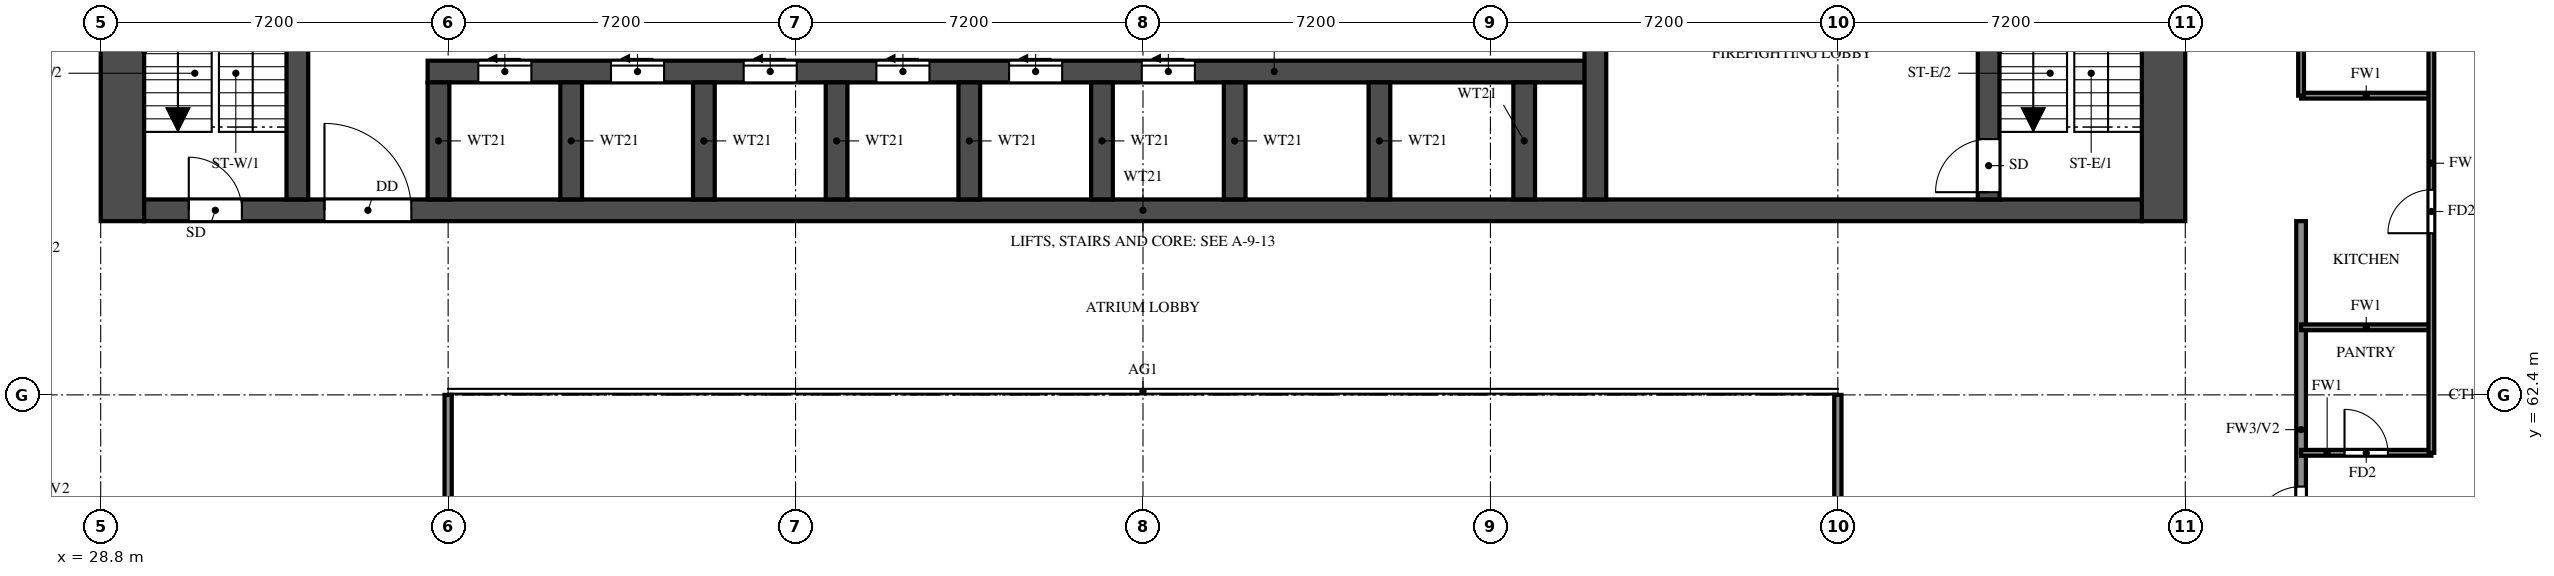
"""IFC4 building model, lengths in metres.
Left out: names, types, materials, properties, quantities, classifications, styles, units other than length and angle.
Written with IfcOpenShell. Run it as: python <this file> out.ifc"""

import sys

from ifc_helpers import new_model, si_unit, direction, frame, frame_2d, origin, place, context, subcontext, project, spatial, rectangle, extrude, element, fill, save


model = new_model("IFC4")
c1 = context("Model", 3, precision=1e-05, world=origin(), true_north=direction((0.0, 1.0)))
c2 = subcontext(c1, "Body", "Model", "MODEL_VIEW")
j1 = project(units=[si_unit("LENGTHUNIT", "METRE"), si_unit("PLANEANGLEUNIT", "RADIAN")], contexts=[c1])
p1 = place(None, origin())
s1 = spatial("IfcSite", under=j1, at=p1, CompositionType="ELEMENT")
p2 = place(p1, origin())
s2 = spatial("IfcBuilding", under=s1, at=p2, CompositionType="ELEMENT")
p3 = place(p2, frame((0.0, 0.0, 83.0)))
s3 = spatial("IfcBuildingStorey", under=s2, at=p3, CompositionType="ELEMENT", Elevation=83.0)
for number, where, z_axis, x_axis in (
    (1, (29.25, 66.0, 0.0), (0.0, 0.0, 1.0), (0.0, 1.0, 0.0)),
    (2, (71.55, 66.0, 0.0), (0.0, 0.0, 1.0), (0.0, 1.0, 0.0)),
):
    element("IfcWall", number, at=place(p3, frame(where, z_axis=z_axis, x_axis=x_axis)), inside=s3, PredefinedType="SHEAR", context=c2, shape_type="SweptSolid", body=[
        extrude(rectangle(XDim=12.0, YDim=0.9, at=frame_2d((6.0, 0.0))), origin(), (0.0, 0.0, 1.0), 3.18),
    ])
p4 = place(p3, frame((29.7, 66.225, 0.0), z_axis=(0.0, 0.0, 1.0), x_axis=(1.0, 0.0, 0.0)))
e3 = element("IfcWall", 3, at=p4, inside=s3, PredefinedType="SHEAR", context=c2, shape_type="SweptSolid", body=[
    extrude(rectangle(XDim=41.4, YDim=0.45, at=frame_2d((20.7, 0.0))), origin(), (0.0, 0.0, 1.0), 3.18),
])
p5 = place(p4, frame((0.925, 0.0, 0.0)))
e4 = element("IfcOpeningElement", 4, at=p5, cuts=e3, PredefinedType="OPENING", context=c2, shape_type="SweptSolid", body=[
    extrude(rectangle(XDim=1.1, YDim=2.1, at=frame_2d((0.55, 1.05))), frame((0.0, 0.235, 0.0), z_axis=(0.0, -1.0, 0.0), x_axis=(1.0, 0.0, 0.0)), (0.0, 0.0, 1.0), 0.47),
])
p6 = place(p4, frame((3.738, 0.0, 0.0)))
e5 = element("IfcOpeningElement", 5, at=p6, cuts=e3, PredefinedType="OPENING", context=c2, shape_type="SweptSolid", body=[
    extrude(rectangle(XDim=1.8, YDim=2.1, at=frame_2d((0.9, 1.05))), frame((0.0, 0.235, 0.0), z_axis=(0.0, -1.0, 0.0), x_axis=(1.0, 0.0, 0.0)), (0.0, 0.0, 1.0), 0.47),
])
p7 = place(p3, frame((35.575, 69.1, 0.0), z_axis=(0.0, 0.0, 1.0), x_axis=(1.0, 0.0, 0.0)))
e6 = element("IfcWall", 6, at=p7, inside=s3, PredefinedType="SHEAR", context=c2, shape_type="SweptSolid", body=[
    extrude(rectangle(XDim=24.2, YDim=0.45, at=frame_2d((12.1, 0.0))), origin(), (0.0, 0.0, 1.0), 3.18),
])
p8 = place(p7, frame((1.05, 0.0, 0.0)))
e7 = element("IfcOpeningElement", 7, at=p8, cuts=e6, PredefinedType="OPENING", context=c2, shape_type="SweptSolid", body=[
    extrude(rectangle(XDim=1.1, YDim=2.1, at=frame_2d((0.55, 1.05))), frame((0.0, 0.235, 0.0), z_axis=(0.0, -1.0, 0.0), x_axis=(1.0, 0.0, 0.0)), (0.0, 0.0, 1.0), 0.47),
])
p9 = place(p7, frame((3.8, 0.0, 0.0)))
e8 = element("IfcOpeningElement", 8, at=p9, cuts=e6, PredefinedType="OPENING", context=c2, shape_type="SweptSolid", body=[
    extrude(rectangle(XDim=1.1, YDim=2.1, at=frame_2d((0.55, 1.05))), frame((0.0, 0.235, 0.0), z_axis=(0.0, -1.0, 0.0), x_axis=(1.0, 0.0, 0.0)), (0.0, 0.0, 1.0), 0.47),
])
p10 = place(p7, frame((6.55, 0.0, 0.0)))
e9 = element("IfcOpeningElement", 9, at=p10, cuts=e6, PredefinedType="OPENING", context=c2, shape_type="SweptSolid", body=[
    extrude(rectangle(XDim=1.1, YDim=2.1, at=frame_2d((0.55, 1.05))), frame((0.0, 0.235, 0.0), z_axis=(0.0, -1.0, 0.0), x_axis=(1.0, 0.0, 0.0)), (0.0, 0.0, 1.0), 0.47),
])
p11 = place(p7, frame((9.3, 0.0, 0.0)))
e10 = element("IfcOpeningElement", 10, at=p11, cuts=e6, PredefinedType="OPENING", context=c2, shape_type="SweptSolid", body=[
    extrude(rectangle(XDim=1.1, YDim=2.1, at=frame_2d((0.55, 1.05))), frame((0.0, 0.235, 0.0), z_axis=(0.0, -1.0, 0.0), x_axis=(1.0, 0.0, 0.0)), (0.0, 0.0, 1.0), 0.47),
])
p12 = place(p7, frame((12.05, 0.0, 0.0)))
e11 = element("IfcOpeningElement", 11, at=p12, cuts=e6, PredefinedType="OPENING", context=c2, shape_type="SweptSolid", body=[
    extrude(rectangle(XDim=1.1, YDim=2.1, at=frame_2d((0.55, 1.05))), frame((0.0, 0.235, 0.0), z_axis=(0.0, -1.0, 0.0), x_axis=(1.0, 0.0, 0.0)), (0.0, 0.0, 1.0), 0.47),
])
p13 = place(p7, frame((14.8, 0.0, 0.0)))
e12 = element("IfcOpeningElement", 12, at=p13, cuts=e6, PredefinedType="OPENING", context=c2, shape_type="SweptSolid", body=[
    extrude(rectangle(XDim=1.1, YDim=2.1, at=frame_2d((0.55, 1.05))), frame((0.0, 0.235, 0.0), z_axis=(0.0, -1.0, 0.0), x_axis=(1.0, 0.0, 0.0)), (0.0, 0.0, 1.0), 0.47),
])
p14 = place(p3, frame((32.875, 66.45, 0.0), z_axis=(0.0, 0.0, 1.0), x_axis=(0.0, 1.0, 0.0)))
e13 = element("IfcWall", 13, at=p14, inside=s3, PredefinedType="SHEAR", context=c2, shape_type="SweptSolid", body=[
    extrude(rectangle(XDim=10.65, YDim=0.45, at=frame_2d((5.325, 0.0))), origin(), (0.0, 0.0, 1.0), 3.18),
])
p15 = place(p3, frame((67.925, 66.45, 0.0), z_axis=(0.0, 0.0, 1.0), x_axis=(0.0, 1.0, 0.0)))
e14 = element("IfcWall", 14, at=p15, inside=s3, PredefinedType="SHEAR", context=c2, shape_type="SweptSolid", body=[
    extrude(rectangle(XDim=10.65, YDim=0.45, at=frame_2d((5.325, 0.0))), origin(), (0.0, 0.0, 1.0), 3.18),
])
p16 = place(p15, frame((0.15, 0.0, 0.0)))
e15 = element("IfcOpeningElement", 15, at=p16, cuts=e14, PredefinedType="OPENING", context=c2, shape_type="SweptSolid", body=[
    extrude(rectangle(XDim=1.1, YDim=2.1, at=frame_2d((0.55, 1.05))), frame((0.0, 0.235, 0.0), z_axis=(0.0, -1.0, 0.0), x_axis=(1.0, 0.0, 0.0)), (0.0, 0.0, 1.0), 0.47),
])
p17 = place(p3, frame((59.775, 66.45, 0.0), z_axis=(0.0, 0.0, 1.0), x_axis=(0.0, 1.0, 0.0)))
e16 = element("IfcWall", 16, at=p17, inside=s3, PredefinedType="SHEAR", context=c2, shape_type="SweptSolid", body=[
    extrude(rectangle(XDim=6.025, YDim=0.45, at=frame_2d((3.013, 0.0))), origin(), (0.0, 0.0, 1.0), 3.18),
])
p18 = place(p17, frame((3.85, 0.0, 0.0)))
e17 = element("IfcOpeningElement", 17, at=p18, cuts=e16, PredefinedType="OPENING", context=c2, shape_type="SweptSolid", body=[
    extrude(rectangle(XDim=1.2, YDim=2.1, at=frame_2d((0.6, 1.05))), frame((0.0, 0.235, 0.0), z_axis=(0.0, -1.0, 0.0), x_axis=(1.0, 0.0, 0.0)), (0.0, 0.0, 1.0), 0.47),
])
for number, where, z_axis, x_axis in (
    (18, (35.8, 66.45, 0.0), (0.0, 0.0, 1.0), (0.0, 1.0, 0.0)),
    (19, (38.55, 66.45, 0.0), (0.0, 0.0, 1.0), (0.0, 1.0, 0.0)),
    (20, (41.3, 66.45, 0.0), (0.0, 0.0, 1.0), (0.0, 1.0, 0.0)),
    (21, (44.05, 66.45, 0.0), (0.0, 0.0, 1.0), (0.0, 1.0, 0.0)),
    (22, (46.8, 66.45, 0.0), (0.0, 0.0, 1.0), (0.0, 1.0, 0.0)),
    (23, (49.55, 66.45, 0.0), (0.0, 0.0, 1.0), (0.0, 1.0, 0.0)),
    (24, (52.3, 66.45, 0.0), (0.0, 0.0, 1.0), (0.0, 1.0, 0.0)),
    (25, (55.3, 66.45, 0.0), (0.0, 0.0, 1.0), (0.0, 1.0, 0.0)),
    (26, (58.3, 66.45, 0.0), (0.0, 0.0, 1.0), (0.0, 1.0, 0.0)),
):
    element("IfcWall", number, at=place(p3, frame(where, z_axis=z_axis, x_axis=x_axis)), inside=s3, PredefinedType="SHEAR", context=c2, shape_type="SweptSolid", body=[
        extrude(rectangle(XDim=2.425, YDim=0.45, at=frame_2d((1.212, 0.0))), origin(), (0.0, 0.0, 1.0), 3.18),
    ])
p19 = place(p3, frame((74.4, 56.4, 0.0), z_axis=(0.0, 0.0, 1.0), x_axis=(0.0, 1.0, 0.0)))
e27 = element("IfcWall", 27, at=p19, inside=s3, PredefinedType="SOLIDWALL", context=c2, shape_type="SweptSolid", body=[
    extrude(rectangle(XDim=9.6, YDim=0.2, at=frame_2d((4.8, 0.0))), origin(), (0.0, 0.0, 1.0), 3.18),
])
p20 = place(p19, frame((0.7, 0.0, 0.0)))
e28 = element("IfcOpeningElement", 28, at=p20, cuts=e27, PredefinedType="OPENING", context=c2, shape_type="SweptSolid", body=[
    extrude(rectangle(XDim=1.0, YDim=2.1, at=frame_2d((0.5, 1.05))), frame((0.0, 0.11, 0.0), z_axis=(0.0, -1.0, 0.0), x_axis=(1.0, 0.0, 0.0)), (0.0, 0.0, 1.0), 0.22),
])
p21 = place(p19, frame((3.1, 0.0, 0.0)))
e29 = element("IfcOpeningElement", 29, at=p21, cuts=e27, PredefinedType="OPENING", context=c2, shape_type="SweptSolid", body=[
    extrude(rectangle(XDim=1.0, YDim=2.1, at=frame_2d((0.5, 1.05))), frame((0.0, 0.11, 0.0), z_axis=(0.0, -1.0, 0.0), x_axis=(1.0, 0.0, 0.0)), (0.0, 0.0, 1.0), 0.22),
])
p22 = place(p3, frame((74.4, 61.2, 0.0), z_axis=(0.0, 0.0, 1.0), x_axis=(1.0, 0.0, 0.0)))
e30 = element("IfcWall", 30, at=p22, inside=s3, PredefinedType="PARTITIONING", context=c2, shape_type="SweptSolid", body=[
    extrude(rectangle(XDim=2.7, YDim=0.12, at=frame_2d((1.35, 0.0))), origin(), (0.0, 0.0, 1.0), 3.18),
])
p23 = place(p22, frame((0.9, 0.0, 0.0)))
e31 = element("IfcOpeningElement", 31, at=p23, cuts=e30, PredefinedType="OPENING", context=c2, shape_type="SweptSolid", body=[
    extrude(rectangle(XDim=0.9, YDim=2.1, at=frame_2d((0.45, 1.05))), frame((0.0, 0.07, 0.0), z_axis=(0.0, -1.0, 0.0), x_axis=(1.0, 0.0, 0.0)), (0.0, 0.0, 1.0), 0.14),
])
for number, where, z_axis, x_axis in (
    (32, (74.4, 63.8, 0.0), (0.0, 0.0, 1.0), (1.0, 0.0, 0.0)),
    (33, (74.4, 68.6, 0.0), (0.0, 0.0, 1.0), (1.0, 0.0, 0.0)),
):
    element("IfcWall", number, at=place(p3, frame(where, z_axis=z_axis, x_axis=x_axis)), inside=s3, PredefinedType="PARTITIONING", context=c2, shape_type="SweptSolid", body=[
        extrude(rectangle(XDim=2.7, YDim=0.12, at=frame_2d((1.35, 0.0))), origin(), (0.0, 0.0, 1.0), 3.18),
    ])
p24 = place(p3, frame((74.4, 68.6, 0.0), z_axis=(0.0, 0.0, 1.0), x_axis=(0.0, 1.0, 0.0)))
e34 = element("IfcWall", 34, at=p24, inside=s3, PredefinedType="PARTITIONING", context=c2, shape_type="SweptSolid", body=[
    extrude(rectangle(XDim=4.6, YDim=0.12, at=frame_2d((2.3, 0.0))), origin(), (0.0, 0.0, 1.0), 3.18),
])
p25 = place(p3, frame((77.1, 61.2, 0.0), z_axis=(0.0, 0.0, 1.0), x_axis=(0.0, 1.0, 0.0)))
e35 = element("IfcWall", 35, at=p25, inside=s3, PredefinedType="PARTITIONING", context=c2, shape_type="SweptSolid", body=[
    extrude(rectangle(XDim=12.0, YDim=0.12, at=frame_2d((6.0, 0.0))), origin(), (0.0, 0.0, 1.0), 3.18),
])
p26 = place(p25, frame((4.55, 0.0, 0.0)))
e36 = element("IfcOpeningElement", 36, at=p26, cuts=e35, PredefinedType="OPENING", context=c2, shape_type="SweptSolid", body=[
    extrude(rectangle(XDim=0.9, YDim=2.1, at=frame_2d((0.45, 1.05))), frame((0.0, 0.07, 0.0), z_axis=(0.0, -1.0, 0.0), x_axis=(1.0, 0.0, 0.0)), (0.0, 0.0, 1.0), 0.14),
])
p27 = place(p25, frame((9.3, 0.0, 0.0)))
e37 = element("IfcOpeningElement", 37, at=p27, cuts=e35, PredefinedType="OPENING", context=c2, shape_type="SweptSolid", body=[
    extrude(rectangle(XDim=0.8, YDim=2.1, at=frame_2d((0.4, 1.05))), frame((0.0, 0.07, 0.0), z_axis=(0.0, -1.0, 0.0), x_axis=(1.0, 0.0, 0.0)), (0.0, 0.0, 1.0), 0.14),
])
for number, where, z_axis, x_axis in (
    (38, (36.0, 48.0, 0.0), (0.0, 0.0, 1.0), (0.0, 1.0, 0.0)),
    (39, (64.8, 48.0, 0.0), (0.0, 0.0, 1.0), (0.0, 1.0, 0.0)),
):
    element("IfcWall", number, at=place(p3, frame(where, z_axis=z_axis, x_axis=x_axis)), inside=s3, PredefinedType="SOLIDWALL", context=c2, shape_type="SweptSolid", body=[
        extrude(rectangle(XDim=14.4, YDim=0.15, at=frame_2d((7.2, 0.0))), origin(), (0.0, 0.0, 1.0), 2.28),
    ])
p28 = place(p5, origin())
e40 = element("IfcDoor", 40, at=p28, inside=s3, OperationType="SINGLE_SWING_LEFT", PredefinedType="DOOR", context=c2, shape_type="SweptSolid", body=[
    extrude(rectangle(XDim=1.1, YDim=2.1, at=frame_2d((0.55, 1.05))), frame((0.0, 0.025, 0.0), z_axis=(0.0, -1.0, 0.0), x_axis=(1.0, 0.0, 0.0)), (0.0, 0.0, 1.0), 0.05),
])
fill(e4, e40)
p29 = place(p16, origin())
e41 = element("IfcDoor", 41, at=p29, inside=s3, OperationType="SINGLE_SWING_LEFT", PredefinedType="DOOR", context=c2, shape_type="SweptSolid", body=[
    extrude(rectangle(XDim=1.1, YDim=2.1, at=frame_2d((0.55, 1.05))), frame((0.0, 0.025, 0.0), z_axis=(0.0, -1.0, 0.0), x_axis=(1.0, 0.0, 0.0)), (0.0, 0.0, 1.0), 0.05),
])
fill(e15, e41)
p30 = place(p6, origin())
e42 = element("IfcDoor", 42, at=p30, inside=s3, OperationType="DOUBLE_DOOR_SINGLE_SWING", PredefinedType="DOOR", context=c2, shape_type="SweptSolid", body=[
    extrude(rectangle(XDim=1.8, YDim=2.1, at=frame_2d((0.9, 1.05))), frame((0.0, 0.025, 0.0), z_axis=(0.0, -1.0, 0.0), x_axis=(1.0, 0.0, 0.0)), (0.0, 0.0, 1.0), 0.05),
])
fill(e5, e42)
p31 = place(p8, origin())
e43 = element("IfcDoor", 43, at=p31, inside=s3, OperationType="SLIDING_TO_LEFT", PredefinedType="DOOR", context=c2, shape_type="SweptSolid", body=[
    extrude(rectangle(XDim=1.1, YDim=2.1, at=frame_2d((0.55, 1.05))), frame((0.0, 0.025, 0.0), z_axis=(0.0, -1.0, 0.0), x_axis=(1.0, 0.0, 0.0)), (0.0, 0.0, 1.0), 0.05),
])
fill(e7, e43)
p32 = place(p9, origin())
e44 = element("IfcDoor", 44, at=p32, inside=s3, OperationType="SLIDING_TO_LEFT", PredefinedType="DOOR", context=c2, shape_type="SweptSolid", body=[
    extrude(rectangle(XDim=1.1, YDim=2.1, at=frame_2d((0.55, 1.05))), frame((0.0, 0.025, 0.0), z_axis=(0.0, -1.0, 0.0), x_axis=(1.0, 0.0, 0.0)), (0.0, 0.0, 1.0), 0.05),
])
fill(e8, e44)
p33 = place(p10, origin())
e45 = element("IfcDoor", 45, at=p33, inside=s3, OperationType="SLIDING_TO_LEFT", PredefinedType="DOOR", context=c2, shape_type="SweptSolid", body=[
    extrude(rectangle(XDim=1.1, YDim=2.1, at=frame_2d((0.55, 1.05))), frame((0.0, 0.025, 0.0), z_axis=(0.0, -1.0, 0.0), x_axis=(1.0, 0.0, 0.0)), (0.0, 0.0, 1.0), 0.05),
])
fill(e9, e45)
p34 = place(p11, origin())
e46 = element("IfcDoor", 46, at=p34, inside=s3, OperationType="SLIDING_TO_LEFT", PredefinedType="DOOR", context=c2, shape_type="SweptSolid", body=[
    extrude(rectangle(XDim=1.1, YDim=2.1, at=frame_2d((0.55, 1.05))), frame((0.0, 0.025, 0.0), z_axis=(0.0, -1.0, 0.0), x_axis=(1.0, 0.0, 0.0)), (0.0, 0.0, 1.0), 0.05),
])
fill(e10, e46)
p35 = place(p12, origin())
e47 = element("IfcDoor", 47, at=p35, inside=s3, OperationType="SLIDING_TO_LEFT", PredefinedType="DOOR", context=c2, shape_type="SweptSolid", body=[
    extrude(rectangle(XDim=1.1, YDim=2.1, at=frame_2d((0.55, 1.05))), frame((0.0, 0.025, 0.0), z_axis=(0.0, -1.0, 0.0), x_axis=(1.0, 0.0, 0.0)), (0.0, 0.0, 1.0), 0.05),
])
fill(e11, e47)
p36 = place(p13, origin())
e48 = element("IfcDoor", 48, at=p36, inside=s3, OperationType="SLIDING_TO_LEFT", PredefinedType="DOOR", context=c2, shape_type="SweptSolid", body=[
    extrude(rectangle(XDim=1.1, YDim=2.1, at=frame_2d((0.55, 1.05))), frame((0.0, 0.025, 0.0), z_axis=(0.0, -1.0, 0.0), x_axis=(1.0, 0.0, 0.0)), (0.0, 0.0, 1.0), 0.05),
])
fill(e12, e48)
p37 = place(p21, origin())
e49 = element("IfcDoor", 49, at=p37, inside=s3, OperationType="SINGLE_SWING_RIGHT", PredefinedType="DOOR", context=c2, shape_type="SweptSolid", body=[
    extrude(rectangle(XDim=1.0, YDim=2.1, at=frame_2d((0.5, 1.05))), frame((0.0, 0.025, 0.0), z_axis=(0.0, -1.0, 0.0), x_axis=(1.0, 0.0, 0.0)), (0.0, 0.0, 1.0), 0.05),
])
fill(e29, e49)
p38 = place(p23, origin())
e50 = element("IfcDoor", 50, at=p38, inside=s3, OperationType="SINGLE_SWING_LEFT", PredefinedType="DOOR", context=c2, shape_type="SweptSolid", body=[
    extrude(rectangle(XDim=0.9, YDim=2.1, at=frame_2d((0.45, 1.05))), frame((0.0, 0.025, 0.0), z_axis=(0.0, -1.0, 0.0), x_axis=(1.0, 0.0, 0.0)), (0.0, 0.0, 1.0), 0.05),
])
fill(e31, e50)
p39 = place(p26, origin())
e51 = element("IfcDoor", 51, at=p39, inside=s3, OperationType="SINGLE_SWING_RIGHT", PredefinedType="DOOR", context=c2, shape_type="SweptSolid", body=[
    extrude(rectangle(XDim=0.9, YDim=2.1, at=frame_2d((0.45, 1.05))), frame((0.0, 0.025, 0.0), z_axis=(0.0, -1.0, 0.0), x_axis=(1.0, 0.0, 0.0)), (0.0, 0.0, 1.0), 0.05),
])
fill(e36, e51)
save(model, sys.argv[1])
